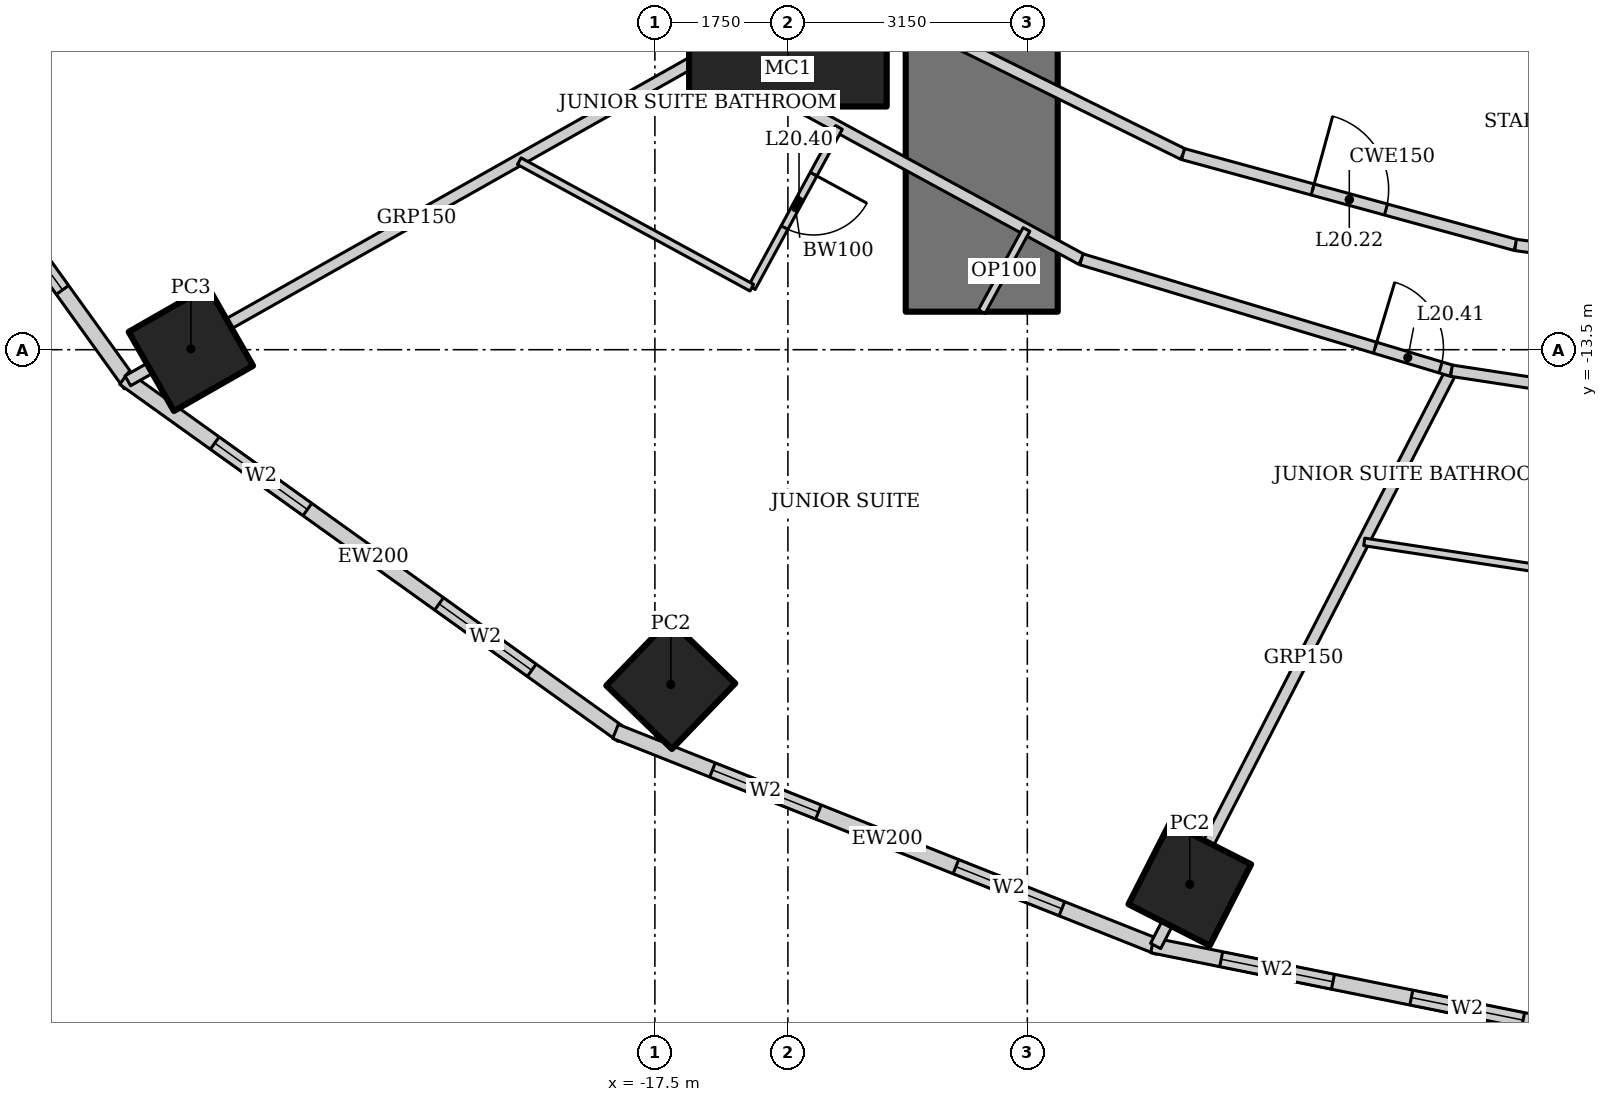
"""IFC4 building model, lengths in metres.
Left out: names, types, materials, properties, quantities, classifications, styles, units other than length and angle.
Written with IfcOpenShell. Run it as: python <this file> out.ifc"""

import sys

from ifc_helpers import new_model, si_unit, direction, frame, frame_2d, origin, origin_2d, place, context, subcontext, project, spatial, rectangle, hollow_rectangle, extrude, element, fill, save


model = new_model("IFC4")
c1 = context("Model", 3, precision=1e-05, world=origin(), true_north=direction((0.0, 1.0)))
c2 = subcontext(c1, "Body", "Model", "MODEL_VIEW")
j1 = project(units=[si_unit("LENGTHUNIT", "METRE"), si_unit("PLANEANGLEUNIT", "RADIAN")], contexts=[c1])
p1 = place(None, origin())
s1 = spatial("IfcSite", under=j1, at=p1, CompositionType="ELEMENT")
p2 = place(p1, origin())
s2 = spatial("IfcBuilding", under=s1, at=p2, CompositionType="ELEMENT")
p3 = place(p2, frame((0.0, 0.0, 87.4)))
s3 = spatial("IfcBuildingStorey", under=s2, at=p3, CompositionType="ELEMENT", Elevation=87.4)
p4 = place(p3, frame((-15.75, -9.0, 0.0), z_axis=(0.0, 0.0, 1.0), x_axis=(1.0, 0.0, 0.0)))
e1 = element("IfcColumn", 1, at=p4, inside=s3, PredefinedType="COLUMN", context=c2, shape_type="SweptSolid", body=[
    extrude(hollow_rectangle(XDim=2.6, YDim=2.6, WallThickness=0.13, at=origin_2d()), origin(), (0.0, 0.0, 1.0), 3.6),
])
p5 = place(p3, frame((-23.605, -13.489, 0.0), z_axis=(0.0, 0.0, 1.0), x_axis=(0.86824298017, 0.496139221777, 0.0)))
e2 = element("IfcColumn", 2, at=p5, inside=s3, PredefinedType="COLUMN", context=c2, shape_type="SweptSolid", body=[
    extrude(hollow_rectangle(XDim=1.2, YDim=1.2, WallThickness=0.12, at=origin_2d()), origin(), (0.0, 0.0, 1.0), 3.6),
])
for number, where, z_axis, x_axis in (
    (3, (-17.291, -17.905, 0.0), (0.0, 0.0, 1.0), (0.695, 0.719, 0.0)),
    (4, (-10.463, -20.534, 0.0), (0.0, 0.0, 1.0), (0.454, 0.891, 0.0)),
):
    element("IfcColumn", number, at=place(p3, frame(where, z_axis=z_axis, x_axis=x_axis)), inside=s3, PredefinedType="COLUMN", context=c2, shape_type="SweptSolid", body=[
        extrude(hollow_rectangle(XDim=1.2, YDim=1.2, WallThickness=0.1, at=origin_2d()), origin(), (0.0, 0.0, 1.0), 3.6),
    ])
p6 = place(p3, frame((-13.2, 13.0, 0.0), z_axis=(0.0, 0.0, 1.0), x_axis=(0.0, -1.0, 0.0)))
e5 = element("IfcWall", 5, at=p6, inside=s3, PredefinedType="SHEAR", context=c2, shape_type="SweptSolid", body=[
    extrude(rectangle(XDim=26.0, YDim=2.0, at=frame_2d((13.0, 0.0))), origin(), (0.0, 0.0, 1.0), 3.6),
])
p7 = place(p6, frame((12.1, 0.0, 0.0)))
e6 = element("IfcOpeningElement", 6, at=p7, cuts=e5, PredefinedType="OPENING", context=c2, shape_type="SweptSolid", body=[
    extrude(rectangle(XDim=1.8, YDim=2.1, at=frame_2d((0.9, 1.05))), frame((0.0, 1.01, 0.0), z_axis=(0.0, -1.0, 0.0), x_axis=(1.0, 0.0, 0.0)), (0.0, 0.0, 1.0), 2.02),
])
p8 = place(p3, frame((-29.26, -7.2, 0.0), z_axis=(0.0, 0.0, 1.0), x_axis=(0.583937613703, -0.811798536155, 0.0)))
e7 = element("IfcWall", 7, at=p8, inside=s3, PredefinedType="SOLIDWALL", context=c2, shape_type="SweptSolid", body=[
    extrude(rectangle(XDim=8.323, YDim=0.2, at=frame_2d((4.162, 0.0))), origin(), (0.0, 0.0, 1.0), 3.45),
])
p9 = place(p8, frame((1.531, 0.0, 0.5)))
e8 = element("IfcOpeningElement", 8, at=p9, cuts=e7, PredefinedType="OPENING", context=c2, shape_type="SweptSolid", body=[
    extrude(rectangle(XDim=1.5, YDim=2.2, at=frame_2d((0.75, 1.1))), frame((0.0, 0.11, 0.0), z_axis=(0.0, -1.0, 0.0), x_axis=(1.0, 0.0, 0.0)), (0.0, 0.0, 1.0), 0.22),
])
p10 = place(p8, frame((5.292, 0.0, 0.5)))
e9 = element("IfcOpeningElement", 9, at=p10, cuts=e7, PredefinedType="OPENING", context=c2, shape_type="SweptSolid", body=[
    extrude(rectangle(XDim=1.5, YDim=2.2, at=frame_2d((0.75, 1.1))), frame((0.0, 0.11, 0.0), z_axis=(0.0, -1.0, 0.0), x_axis=(1.0, 0.0, 0.0)), (0.0, 0.0, 1.0), 0.22),
])
p11 = place(p3, frame((-24.482, -13.875, 0.0), z_axis=(0.0, 0.0, 1.0), x_axis=(0.812791321576, -0.582554948112, 0.0)))
e10 = element("IfcWall", 10, at=p11, inside=s3, PredefinedType="SOLIDWALL", context=c2, shape_type="SweptSolid", body=[
    extrude(rectangle(XDim=8.063, YDim=0.2, at=frame_2d((4.032, 0.0))), origin(), (0.0, 0.0, 1.0), 3.45),
])
p12 = place(p11, frame((1.466, 0.0, 0.5)))
e11 = element("IfcOpeningElement", 11, at=p12, cuts=e10, PredefinedType="OPENING", context=c2, shape_type="SweptSolid", body=[
    extrude(rectangle(XDim=1.5, YDim=2.2, at=frame_2d((0.75, 1.1))), frame((0.0, 0.11, 0.0), z_axis=(0.0, -1.0, 0.0), x_axis=(1.0, 0.0, 0.0)), (0.0, 0.0, 1.0), 0.22),
])
p13 = place(p11, frame((5.097, 0.0, 0.5)))
e12 = element("IfcOpeningElement", 12, at=p13, cuts=e10, PredefinedType="OPENING", context=c2, shape_type="SweptSolid", body=[
    extrude(rectangle(XDim=1.5, YDim=2.2, at=frame_2d((0.75, 1.1))), frame((0.0, 0.11, 0.0), z_axis=(0.0, -1.0, 0.0), x_axis=(1.0, 0.0, 0.0)), (0.0, 0.0, 1.0), 0.22),
])
p14 = place(p3, frame((-18.018, -18.523, 0.0), z_axis=(0.0, 0.0, 1.0), x_axis=(0.929358351251, -0.369178892895, 0.0)))
e13 = element("IfcWall", 13, at=p14, inside=s3, PredefinedType="SOLIDWALL", context=c2, shape_type="SweptSolid", body=[
    extrude(rectangle(XDim=7.692, YDim=0.2, at=frame_2d((3.846, 0.0))), origin(), (0.0, 0.0, 1.0), 3.45),
])
p15 = place(p14, frame((1.373, 0.0, 0.5)))
e14 = element("IfcOpeningElement", 14, at=p15, cuts=e13, PredefinedType="OPENING", context=c2, shape_type="SweptSolid", body=[
    extrude(rectangle(XDim=1.5, YDim=2.2, at=frame_2d((0.75, 1.1))), frame((0.0, 0.11, 0.0), z_axis=(0.0, -1.0, 0.0), x_axis=(1.0, 0.0, 0.0)), (0.0, 0.0, 1.0), 0.22),
])
p16 = place(p14, frame((4.819, 0.0, 0.5)))
e15 = element("IfcOpeningElement", 15, at=p16, cuts=e13, PredefinedType="OPENING", context=c2, shape_type="SweptSolid", body=[
    extrude(rectangle(XDim=1.5, YDim=2.2, at=frame_2d((0.75, 1.1))), frame((0.0, 0.11, 0.0), z_axis=(0.0, -1.0, 0.0), x_axis=(1.0, 0.0, 0.0)), (0.0, 0.0, 1.0), 0.22),
])
p17 = place(p3, frame((-10.957, -21.337, 0.0), z_axis=(0.0, 0.0, 1.0), x_axis=(0.980251657452, -0.197754110105, 0.0)))
e16 = element("IfcWall", 16, at=p17, inside=s3, PredefinedType="SOLIDWALL", context=c2, shape_type="SweptSolid", body=[
    extrude(rectangle(XDim=5.904, YDim=0.2, at=frame_2d((2.952, 0.0))), origin(), (0.0, 0.0, 1.0), 3.45),
])
p18 = place(p17, frame((0.926, 0.0, 0.5)))
e17 = element("IfcOpeningElement", 17, at=p18, cuts=e16, PredefinedType="OPENING", context=c2, shape_type="SweptSolid", body=[
    extrude(rectangle(XDim=1.5, YDim=2.2, at=frame_2d((0.75, 1.1))), frame((0.0, 0.11, 0.0), z_axis=(0.0, -1.0, 0.0), x_axis=(1.0, 0.0, 0.0)), (0.0, 0.0, 1.0), 0.22),
])
p19 = place(p17, frame((3.478, 0.0, 0.5)))
e18 = element("IfcOpeningElement", 18, at=p19, cuts=e16, PredefinedType="OPENING", context=c2, shape_type="SweptSolid", body=[
    extrude(rectangle(XDim=1.5, YDim=2.2, at=frame_2d((0.75, 1.1))), frame((0.0, 0.11, 0.0), z_axis=(0.0, -1.0, 0.0), x_axis=(1.0, 0.0, 0.0)), (0.0, 0.0, 1.0), 0.22),
])
p20 = place(p3, frame((-24.435, -13.909, 0.0), z_axis=(0.0, 0.0, 1.0), x_axis=(0.87090601027, 0.491449612143, 0.0)))
e19 = element("IfcWall", 19, at=p20, inside=s3, PredefinedType="PARTITIONING", context=c2, shape_type="SweptSolid", body=[
    extrude(rectangle(XDim=8.726, YDim=0.15, at=frame_2d((4.363, 0.0))), origin(), (0.0, 0.0, 1.0), 2.693),
])
p21 = place(p3, frame((-10.912, -21.346, 0.0), z_axis=(0.0, 0.0, 1.0), x_axis=(0.457327273085, 0.889298468059, 0.0)))
e20 = element("IfcWall", 20, at=p21, inside=s3, PredefinedType="PARTITIONING", context=c2, shape_type="SweptSolid", body=[
    extrude(rectangle(XDim=8.511, YDim=0.15, at=frame_2d((4.256, 0.0))), origin(), (0.0, 0.0, 1.0), 2.528),
])
p22 = place(p3, frame((-20.984, -5.232, 0.0), z_axis=(0.0, 0.0, 1.0), x_axis=(0.687062608696, -0.726598218916, 0.0)))
e21 = element("IfcWall", 21, at=p22, inside=s3, PredefinedType="PARTITIONING", context=c2, shape_type="SweptSolid", body=[
    extrude(rectangle(XDim=6.039, YDim=0.15, at=frame_2d((3.02, 0.0))), origin(), (0.0, 0.0, 1.0), 3.45),
])
p23 = place(p22, frame((0.15, 0.0, 0.0)))
e22 = element("IfcOpeningElement", 22, at=p23, cuts=e21, PredefinedType="OPENING", context=c2, shape_type="SweptSolid", body=[
    extrude(rectangle(XDim=0.9, YDim=2.1, at=frame_2d((0.45, 1.05))), frame((0.0, 0.085, 0.0), z_axis=(0.0, -1.0, 0.0), x_axis=(1.0, 0.0, 0.0)), (0.0, 0.0, 1.0), 0.17),
])
p24 = place(p3, frame((-16.835, -9.62, 0.0), z_axis=(0.0, 0.0, 1.0), x_axis=(0.878450059298, -0.477834169267, 0.0)))
e23 = element("IfcWall", 23, at=p24, inside=s3, PredefinedType="PARTITIONING", context=c2, shape_type="SweptSolid", body=[
    extrude(rectangle(XDim=5.631, YDim=0.15, at=frame_2d((2.815, 0.0))), origin(), (0.0, 0.0, 1.0), 3.45),
])
p25 = place(p3, frame((-11.888, -12.311, 0.0), z_axis=(0.0, 0.0, 1.0), x_axis=(0.957564241242, -0.288219922793, 0.0)))
e24 = element("IfcWall", 24, at=p25, inside=s3, PredefinedType="PARTITIONING", context=c2, shape_type="SweptSolid", body=[
    extrude(rectangle(XDim=5.085, YDim=0.15, at=frame_2d((2.542, 0.0))), origin(), (0.0, 0.0, 1.0), 3.45),
])
p26 = place(p25, frame((4.035, 0.0, 0.0)))
e25 = element("IfcOpeningElement", 25, at=p26, cuts=e24, PredefinedType="OPENING", context=c2, shape_type="SweptSolid", body=[
    extrude(rectangle(XDim=0.9, YDim=2.1, at=frame_2d((0.45, 1.05))), frame((0.0, 0.085, 0.0), z_axis=(0.0, -1.0, 0.0), x_axis=(1.0, 0.0, 0.0)), (0.0, 0.0, 1.0), 0.17),
])
p27 = place(p3, frame((-7.019, -13.776, 0.0), z_axis=(0.0, 0.0, 1.0), x_axis=(0.988564270062, -0.150800145746, 0.0)))
e26 = element("IfcWall", 26, at=p27, inside=s3, PredefinedType="PARTITIONING", context=c2, shape_type="SweptSolid", body=[
    extrude(rectangle(XDim=3.751, YDim=0.15, at=frame_2d((1.875, 0.0))), origin(), (0.0, 0.0, 1.0), 3.45),
])
p28 = place(p3, frame((-15.147, -8.656, 0.0), z_axis=(0.0, 0.0, 1.0), x_axis=(0.89656943448, -0.442903205177, 0.0)))
e27 = element("IfcWall", 27, at=p28, inside=s3, PredefinedType="PARTITIONING", context=c2, shape_type="SweptSolid", body=[
    extrude(rectangle(XDim=5.126, YDim=0.15, at=frame_2d((2.563, 0.0))), origin(), (0.0, 0.0, 1.0), 3.45),
])
p29 = place(p3, frame((-10.551, -10.926, 0.0), z_axis=(0.0, 0.0, 1.0), x_axis=(0.964644466646, -0.263554648923, 0.0)))
e28 = element("IfcWall", 28, at=p29, inside=s3, PredefinedType="PARTITIONING", context=c2, shape_type="SweptSolid", body=[
    extrude(rectangle(XDim=4.535, YDim=0.15, at=frame_2d((2.268, 0.0))), origin(), (0.0, 0.0, 1.0), 3.45),
])
p30 = place(p29, frame((1.768, 0.0, 0.0)))
e29 = element("IfcOpeningElement", 29, at=p30, cuts=e28, PredefinedType="OPENING", context=c2, shape_type="SweptSolid", body=[
    extrude(rectangle(XDim=1.0, YDim=2.1, at=frame_2d((0.5, 1.05))), frame((0.0, 0.085, 0.0), z_axis=(0.0, -1.0, 0.0), x_axis=(1.0, 0.0, 0.0)), (0.0, 0.0, 1.0), 0.17),
])
p31 = place(p3, frame((-6.176, -12.122, 0.0), z_axis=(0.0, 0.0, 1.0), x_axis=(0.990563451353, -0.137054911782, 0.0)))
e30 = element("IfcWall", 30, at=p31, inside=s3, PredefinedType="PARTITIONING", context=c2, shape_type="SweptSolid", body=[
    extrude(rectangle(XDim=3.304, YDim=0.15, at=frame_2d((1.652, 0.0))), origin(), (0.0, 0.0, 1.0), 3.45),
])
p32 = place(p3, frame((-15.078, -10.576, 0.0), z_axis=(0.0, 0.0, 1.0), x_axis=(-0.477832549678, -0.878450940274, 0.0)))
e31 = element("IfcWall", 31, at=p32, inside=s3, PredefinedType="PARTITIONING", context=c2, shape_type="SweptSolid", body=[
    extrude(rectangle(XDim=2.4, YDim=0.1, at=frame_2d((1.2, 0.0))), origin(), (0.0, 0.0, 1.0), 3.45),
])
p33 = place(p32, frame((0.7, 0.0, 0.0)))
e32 = element("IfcOpeningElement", 32, at=p33, cuts=e31, PredefinedType="OPENING", context=c2, shape_type="SweptSolid", body=[
    extrude(rectangle(XDim=0.8, YDim=2.1, at=frame_2d((0.4, 1.05))), frame((0.0, 0.06, 0.0), z_axis=(0.0, -1.0, 0.0), x_axis=(1.0, 0.0, 0.0)), (0.0, 0.0, 1.0), 0.12),
])
p34 = place(p3, frame((-16.225, -12.684, 0.0), z_axis=(0.0, 0.0, 1.0), x_axis=(-0.878473578893, 0.477790928322, 0.0)))
e33 = element("IfcWall", 33, at=p34, inside=s3, PredefinedType="PARTITIONING", context=c2, shape_type="SweptSolid", body=[
    extrude(rectangle(XDim=3.483, YDim=0.1, at=frame_2d((1.741, 0.0))), origin(), (0.0, 0.0, 1.0), 3.45),
])
p35 = place(p3, frame((-5.404, -16.45, 0.0), z_axis=(0.0, 0.0, 1.0), x_axis=(-0.988568792086, 0.150770498819, 0.0)))
e34 = element("IfcWall", 34, at=p35, inside=s3, PredefinedType="PARTITIONING", context=c2, shape_type="SweptSolid", body=[
    extrude(rectangle(XDim=2.795, YDim=0.1, at=frame_2d((1.397, 0.0))), origin(), (0.0, 0.0, 1.0), 3.45),
])
p36 = place(p3, frame((-13.2, -13.0, 0.0), z_axis=(0.0, 0.0, 1.0), x_axis=(0.477852414256, 0.878440134665, 0.0)))
e35 = element("IfcWall", 35, at=p36, inside=s3, PredefinedType="PARTITIONING", context=c2, shape_type="SweptSolid", body=[
    extrude(rectangle(XDim=1.232, YDim=0.1, at=frame_2d((0.616, 0.0))), origin(), (0.0, 0.0, 1.0), 3.45),
])
p37 = place(p10, origin())
e36 = element("IfcWindow", 36, at=p37, inside=s3, PartitioningType="SINGLE_PANEL", PredefinedType="WINDOW", context=c2, shape_type="SweptSolid", body=[
    extrude(rectangle(XDim=1.5, YDim=2.2, at=frame_2d((0.75, 1.1))), frame((0.0, 0.03, 0.0), z_axis=(0.0, -1.0, 0.0), x_axis=(1.0, 0.0, 0.0)), (0.0, 0.0, 1.0), 0.06),
])
fill(e9, e36)
p38 = place(p12, origin())
e37 = element("IfcWindow", 37, at=p38, inside=s3, PartitioningType="SINGLE_PANEL", PredefinedType="WINDOW", context=c2, shape_type="SweptSolid", body=[
    extrude(rectangle(XDim=1.5, YDim=2.2, at=frame_2d((0.75, 1.1))), frame((0.0, 0.03, 0.0), z_axis=(0.0, -1.0, 0.0), x_axis=(1.0, 0.0, 0.0)), (0.0, 0.0, 1.0), 0.06),
])
fill(e11, e37)
p39 = place(p13, origin())
e38 = element("IfcWindow", 38, at=p39, inside=s3, PartitioningType="SINGLE_PANEL", PredefinedType="WINDOW", context=c2, shape_type="SweptSolid", body=[
    extrude(rectangle(XDim=1.5, YDim=2.2, at=frame_2d((0.75, 1.1))), frame((0.0, 0.03, 0.0), z_axis=(0.0, -1.0, 0.0), x_axis=(1.0, 0.0, 0.0)), (0.0, 0.0, 1.0), 0.06),
])
fill(e12, e38)
p40 = place(p15, origin())
e39 = element("IfcWindow", 39, at=p40, inside=s3, PartitioningType="SINGLE_PANEL", PredefinedType="WINDOW", context=c2, shape_type="SweptSolid", body=[
    extrude(rectangle(XDim=1.5, YDim=2.2, at=frame_2d((0.75, 1.1))), frame((0.0, 0.03, 0.0), z_axis=(0.0, -1.0, 0.0), x_axis=(1.0, 0.0, 0.0)), (0.0, 0.0, 1.0), 0.06),
])
fill(e14, e39)
p41 = place(p16, origin())
e40 = element("IfcWindow", 40, at=p41, inside=s3, PartitioningType="SINGLE_PANEL", PredefinedType="WINDOW", context=c2, shape_type="SweptSolid", body=[
    extrude(rectangle(XDim=1.5, YDim=2.2, at=frame_2d((0.75, 1.1))), frame((0.0, 0.03, 0.0), z_axis=(0.0, -1.0, 0.0), x_axis=(1.0, 0.0, 0.0)), (0.0, 0.0, 1.0), 0.06),
])
fill(e15, e40)
p42 = place(p18, origin())
e41 = element("IfcWindow", 41, at=p42, inside=s3, PartitioningType="SINGLE_PANEL", PredefinedType="WINDOW", context=c2, shape_type="SweptSolid", body=[
    extrude(rectangle(XDim=1.5, YDim=2.2, at=frame_2d((0.75, 1.1))), frame((0.0, 0.03, 0.0), z_axis=(0.0, -1.0, 0.0), x_axis=(1.0, 0.0, 0.0)), (0.0, 0.0, 1.0), 0.06),
])
fill(e17, e41)
p43 = place(p19, origin())
e42 = element("IfcWindow", 42, at=p43, inside=s3, PartitioningType="SINGLE_PANEL", PredefinedType="WINDOW", context=c2, shape_type="SweptSolid", body=[
    extrude(rectangle(XDim=1.5, YDim=2.2, at=frame_2d((0.75, 1.1))), frame((0.0, 0.03, 0.0), z_axis=(0.0, -1.0, 0.0), x_axis=(1.0, 0.0, 0.0)), (0.0, 0.0, 1.0), 0.06),
])
fill(e18, e42)
p44 = place(p30, origin())
e43 = element("IfcDoor", 43, at=p44, inside=s3, OperationType="SINGLE_SWING_LEFT", PredefinedType="DOOR", context=c2, shape_type="SweptSolid", body=[
    extrude(rectangle(XDim=1.0, YDim=2.1, at=frame_2d((0.5, 1.05))), frame((0.0, 0.025, 0.0), z_axis=(0.0, -1.0, 0.0), x_axis=(1.0, 0.0, 0.0)), (0.0, 0.0, 1.0), 0.05),
])
fill(e29, e43)
p45 = place(p33, origin())
e44 = element("IfcDoor", 44, at=p45, inside=s3, OperationType="SINGLE_SWING_LEFT", PredefinedType="DOOR", context=c2, shape_type="SweptSolid", body=[
    extrude(rectangle(XDim=0.8, YDim=2.1, at=frame_2d((0.4, 1.05))), frame((0.0, 0.025, 0.0), z_axis=(0.0, -1.0, 0.0), x_axis=(1.0, 0.0, 0.0)), (0.0, 0.0, 1.0), 0.05),
])
fill(e32, e44)
p46 = place(p26, origin())
e45 = element("IfcDoor", 45, at=p46, inside=s3, OperationType="SINGLE_SWING_LEFT", PredefinedType="DOOR", context=c2, shape_type="SweptSolid", body=[
    extrude(rectangle(XDim=0.9, YDim=2.1, at=frame_2d((0.45, 1.05))), frame((0.0, 0.025, 0.0), z_axis=(0.0, -1.0, 0.0), x_axis=(1.0, 0.0, 0.0)), (0.0, 0.0, 1.0), 0.05),
])
fill(e25, e45)
save(model, sys.argv[1])
